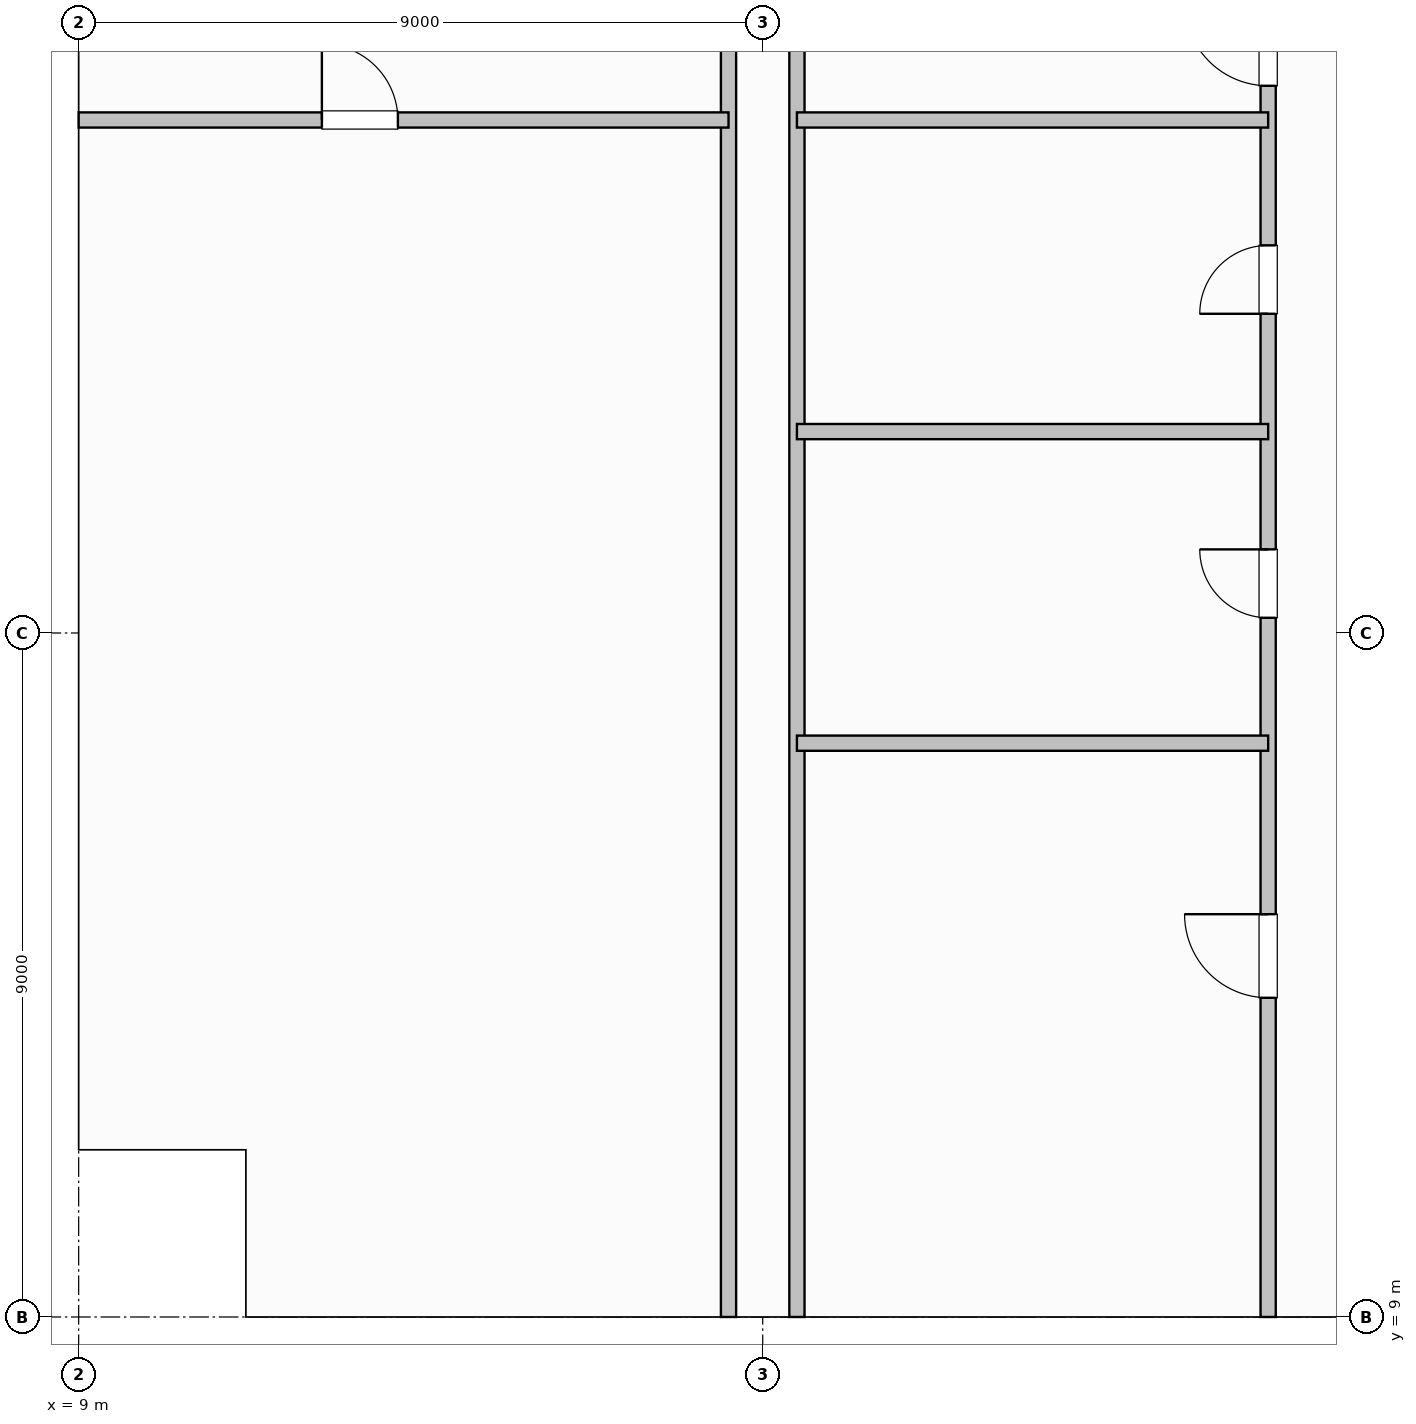
"""IFC4 building model, lengths in metres.
Left out: names, types, materials, properties, quantities, classifications, styles, units other than length and angle.
Written with IfcOpenShell. Run it as: python <this file> out.ifc"""

import sys

from ifc_helpers import new_model, si_unit, direction, frame, frame_2d, origin, origin_2d, place, context, subcontext, project, spatial, rectangle, i_section, extrude, element, fill, save


model = new_model("IFC4")
c1 = context("Model", 3, precision=1e-05, world=origin(), true_north=direction((0.0, 1.0)))
c2 = subcontext(c1, "Body", "Model", "MODEL_VIEW")
j1 = project(units=[si_unit("LENGTHUNIT", "METRE"), si_unit("PLANEANGLEUNIT", "RADIAN")], contexts=[c1])
p1 = place(None, origin())
s1 = spatial("IfcSite", under=j1, at=p1, CompositionType="ELEMENT")
p2 = place(p1, origin())
s2 = spatial("IfcBuilding", under=s1, at=p2, CompositionType="ELEMENT")
p3 = place(p2, frame((0.0, 0.0, 100.2)))
s3 = spatial("IfcBuildingStorey", under=s2, at=p3, CompositionType="ELEMENT", Elevation=100.2)
for number, where, z_axis, x_axis in (
    (1, (9.0, 18.0, 0.0), (0.0, 0.0, 1.0), (1.0, 0.0, 0.0)),
    (2, (18.0, 9.0, 0.0), (0.0, 0.0, 1.0), (1.0, 0.0, 0.0)),
    (3, (18.0, 18.0, 0.0), (0.0, 0.0, 1.0), (1.0, 0.0, 0.0)),
):
    element("IfcColumn", number, at=place(p3, frame(where, z_axis=z_axis, x_axis=x_axis)), inside=s3, PredefinedType="COLUMN", context=c2, shape_type="SweptSolid", body=[
        extrude(i_section(OverallWidth=0.424, OverallDepth=0.474, WebThickness=0.048, FlangeThickness=0.077, FilletRadius=0.015, at=origin_2d()), origin(), (0.0, 0.0, 1.0), 4.8),
    ])
p4 = place(p3, frame((24.65, 9.0, 0.0), z_axis=(0.0, 0.0, 1.0), x_axis=(0.0, 1.0, 0.0)))
e4 = element("IfcWall", 4, at=p4, inside=s3, PredefinedType="PARTITIONING", context=c2, shape_type="SweptSolid", body=[
    extrude(rectangle(XDim=19.2, YDim=0.2, at=frame_2d((9.6, 0.0))), origin(), (0.0, 0.0, 1.0), 3.677),
])
p5 = place(p4, frame((4.2, 0.0, 0.0)))
e5 = element("IfcOpeningElement", 5, at=p5, cuts=e4, PredefinedType="OPENING", context=c2, shape_type="SweptSolid", body=[
    extrude(rectangle(XDim=1.1, YDim=2.15, at=frame_2d((0.55, 1.075))), frame((0.0, 0.11, 0.0), z_axis=(0.0, -1.0, 0.0), x_axis=(1.0, 0.0, 0.0)), (0.0, 0.0, 1.0), 0.22),
])
p6 = place(p4, frame((16.2, 0.0, 0.0)))
e6 = element("IfcOpeningElement", 6, at=p6, cuts=e4, PredefinedType="OPENING", context=c2, shape_type="SweptSolid", body=[
    extrude(rectangle(XDim=1.1, YDim=2.15, at=frame_2d((0.55, 1.075))), frame((0.0, 0.11, 0.0), z_axis=(0.0, -1.0, 0.0), x_axis=(1.0, 0.0, 0.0)), (0.0, 0.0, 1.0), 0.22),
])
p7 = place(p4, frame((9.2, 0.0, 0.0)))
e7 = element("IfcOpeningElement", 7, at=p7, cuts=e4, PredefinedType="OPENING", context=c2, shape_type="SweptSolid", body=[
    extrude(rectangle(XDim=0.9, YDim=2.1, at=frame_2d((0.45, 1.05))), frame((0.0, 0.11, 0.0), z_axis=(0.0, -1.0, 0.0), x_axis=(1.0, 0.0, 0.0)), (0.0, 0.0, 1.0), 0.22),
])
p8 = place(p4, frame((13.2, 0.0, 0.0)))
e8 = element("IfcOpeningElement", 8, at=p8, cuts=e4, PredefinedType="OPENING", context=c2, shape_type="SweptSolid", body=[
    extrude(rectangle(XDim=0.9, YDim=2.1, at=frame_2d((0.45, 1.05))), frame((0.0, 0.11, 0.0), z_axis=(0.0, -1.0, 0.0), x_axis=(1.0, 0.0, 0.0)), (0.0, 0.0, 1.0), 0.22),
])
p9 = place(p3, frame((17.55, 9.0, 0.0), z_axis=(0.0, 0.0, 1.0), x_axis=(0.0, 1.0, 0.0)))
e9 = element("IfcWall", 9, at=p9, inside=s3, PredefinedType="PARTITIONING", context=c2, shape_type="SweptSolid", body=[
    extrude(rectangle(XDim=18.15, YDim=0.2, at=frame_2d((9.075, 0.0))), origin(), (0.0, 0.0, 1.0), 3.839),
])
p10 = place(p3, frame((18.45, 9.0, 0.0), z_axis=(0.0, 0.0, 1.0), x_axis=(0.0, 1.0, 0.0)))
e10 = element("IfcWall", 10, at=p10, inside=s3, PredefinedType="PARTITIONING", context=c2, shape_type="SweptSolid", body=[
    extrude(rectangle(XDim=18.15, YDim=0.2, at=frame_2d((9.075, 0.0))), origin(), (0.0, 0.0, 1.0), 3.677),
])
p11 = place(p3, frame((9.0, 24.75, 0.0), z_axis=(0.0, 0.0, 1.0), x_axis=(1.0, 0.0, 0.0)))
e11 = element("IfcWall", 11, at=p11, inside=s3, PredefinedType="PARTITIONING", context=c2, shape_type="SweptSolid", body=[
    extrude(rectangle(XDim=8.55, YDim=0.2, at=frame_2d((4.275, 0.0))), origin(), (0.0, 0.0, 1.0), 3.677),
])
p12 = place(p11, frame((3.2, 0.0, 0.0)))
e12 = element("IfcOpeningElement", 12, at=p12, cuts=e11, PredefinedType="OPENING", context=c2, shape_type="SweptSolid", body=[
    extrude(rectangle(XDim=1.0, YDim=2.15, at=frame_2d((0.5, 1.075))), frame((0.0, 0.11, 0.0), z_axis=(0.0, -1.0, 0.0), x_axis=(1.0, 0.0, 0.0)), (0.0, 0.0, 1.0), 0.22),
])
for number, where, z_axis, x_axis in (
    (13, (18.45, 24.75, 0.0), (0.0, 0.0, 1.0), (1.0, 0.0, 0.0)),
    (14, (18.45, 16.55, 0.0), (0.0, 0.0, 1.0), (1.0, 0.0, 0.0)),
    (15, (18.45, 20.65, 0.0), (0.0, 0.0, 1.0), (1.0, 0.0, 0.0)),
):
    element("IfcWall", number, at=place(p3, frame(where, z_axis=z_axis, x_axis=x_axis)), inside=s3, PredefinedType="PARTITIONING", context=c2, shape_type="SweptSolid", body=[
        extrude(rectangle(XDim=6.2, YDim=0.2, at=frame_2d((3.1, 0.0))), origin(), (0.0, 0.0, 1.0), 4.47),
    ])
p13 = place(p5, origin())
e16 = element("IfcDoor", 16, at=p13, inside=s3, OperationType="SINGLE_SWING_RIGHT", PredefinedType="DOOR", context=c2, shape_type="SweptSolid", body=[
    extrude(rectangle(XDim=1.1, YDim=2.15, at=frame_2d((0.55, 1.075))), frame((0.0, 0.025, 0.0), z_axis=(0.0, -1.0, 0.0), x_axis=(1.0, 0.0, 0.0)), (0.0, 0.0, 1.0), 0.05),
])
fill(e5, e16)
p14 = place(p12, origin())
e17 = element("IfcDoor", 17, at=p14, inside=s3, OperationType="SINGLE_SWING_LEFT", PredefinedType="DOOR", context=c2, shape_type="SweptSolid", body=[
    extrude(rectangle(XDim=1.0, YDim=2.15, at=frame_2d((0.5, 1.075))), frame((0.0, 0.025, 0.0), z_axis=(0.0, -1.0, 0.0), x_axis=(1.0, 0.0, 0.0)), (0.0, 0.0, 1.0), 0.05),
])
fill(e12, e17)
p15 = place(p6, origin())
e18 = element("IfcDoor", 18, at=p15, inside=s3, OperationType="SINGLE_SWING_RIGHT", PredefinedType="DOOR", context=c2, shape_type="SweptSolid", body=[
    extrude(rectangle(XDim=1.1, YDim=2.15, at=frame_2d((0.55, 1.075))), frame((0.0, 0.025, 0.0), z_axis=(0.0, -1.0, 0.0), x_axis=(1.0, 0.0, 0.0)), (0.0, 0.0, 1.0), 0.05),
])
fill(e6, e18)
p16 = place(p7, origin())
e19 = element("IfcDoor", 19, at=p16, inside=s3, OperationType="SINGLE_SWING_RIGHT", PredefinedType="DOOR", context=c2, shape_type="SweptSolid", body=[
    extrude(rectangle(XDim=0.9, YDim=2.1, at=frame_2d((0.45, 1.05))), frame((0.0, 0.025, 0.0), z_axis=(0.0, -1.0, 0.0), x_axis=(1.0, 0.0, 0.0)), (0.0, 0.0, 1.0), 0.05),
])
fill(e7, e19)
p17 = place(p8, origin())
e20 = element("IfcDoor", 20, at=p17, inside=s3, OperationType="SINGLE_SWING_LEFT", PredefinedType="DOOR", context=c2, shape_type="SweptSolid", body=[
    extrude(rectangle(XDim=0.9, YDim=2.1, at=frame_2d((0.45, 1.05))), frame((0.0, 0.025, 0.0), z_axis=(0.0, -1.0, 0.0), x_axis=(1.0, 0.0, 0.0)), (0.0, 0.0, 1.0), 0.05),
])
fill(e8, e20)
save(model, sys.argv[1])
